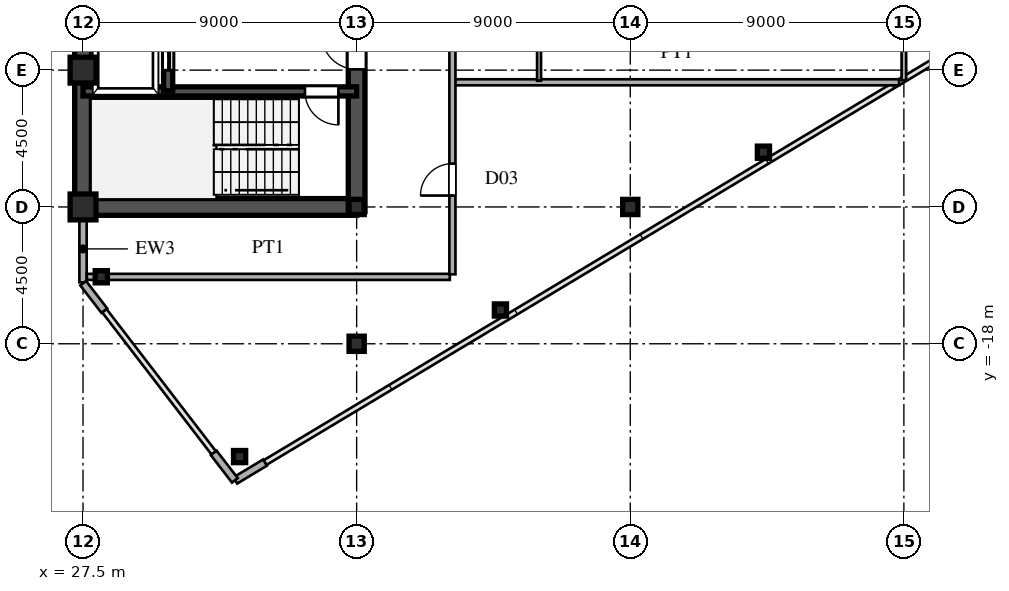
"""IFC4 building model, lengths in metres.
Left out: names, types, materials, properties, quantities, classifications, styles, units other than length and angle.
Written with IfcOpenShell. Run it as: python <this file> out.ifc"""

import sys

from ifc_helpers import new_model, si_unit, direction, frame, frame_2d, origin, origin_2d, place, context, subcontext, project, spatial, rectangle, hollow_rectangle, i_section, extrude, source, transform, mapped, element, fill, save


model = new_model("IFC4")
c1 = context("Model", 3, precision=1e-05, world=origin(), true_north=direction((0.0, 1.0)))
c2 = subcontext(c1, "Body", "Model", "MODEL_VIEW")
j1 = project(units=[si_unit("LENGTHUNIT", "METRE"), si_unit("PLANEANGLEUNIT", "RADIAN")], contexts=[c1])
p1 = place(None, origin())
s1 = spatial("IfcSite", under=j1, at=p1, CompositionType="ELEMENT")
p2 = place(p1, origin())
s2 = spatial("IfcBuilding", under=s1, at=p2, CompositionType="ELEMENT")
p3 = place(p2, frame((0.0, 0.0, 206.7)))
s3 = spatial("IfcBuildingStorey", under=s2, at=p3, CompositionType="ELEMENT", Elevation=206.7)
m1 = source(origin(), c2, "Body", "SweptSolid", [
    extrude(hollow_rectangle(XDim=0.85, YDim=0.85, WallThickness=0.036, at=origin_2d()), origin(), (0.0, 0.0, 1.0), 3.6),
])
for number, where, z_axis, x_axis in (
    (1, (27.5, -13.5, 0.0), (0.0, 0.0, 1.0), (1.0, 0.0, 0.0)),
    (2, (27.5, -9.0, 0.0), (0.0, 0.0, 1.0), (1.0, 0.0, 0.0)),
):
    element("IfcColumn", number, at=place(p3, frame(where, z_axis=z_axis, x_axis=x_axis)), inside=s3, PredefinedType="COLUMN", context=c2, shape_type="MappedRepresentation", body=[
        mapped(m1, transform((0.0, 0.0, 0.0), scale=1.0)),
    ])
m2 = source(origin(), c2, "Body", "SweptSolid", [
    extrude(i_section(OverallWidth=0.5, OverallDepth=0.5, WebThickness=0.02, FlangeThickness=0.032, at=origin_2d()), origin(), (0.0, 0.0, 1.0), 3.6),
])
for number, where, z_axis, x_axis in (
    (3, (36.5, -18.0, 0.0), (0.0, 0.0, 1.0), (1.0, 0.0, 0.0)),
    (4, (36.5, -13.5, 0.0), (0.0, 0.0, 1.0), (1.0, 0.0, 0.0)),
    (5, (45.5, -13.5, 0.0), (0.0, 0.0, 1.0), (1.0, 0.0, 0.0)),
):
    element("IfcColumn", number, at=place(p3, frame(where, z_axis=z_axis, x_axis=x_axis)), inside=s3, PredefinedType="COLUMN", context=c2, shape_type="MappedRepresentation", body=[
        mapped(m2, transform((0.0, 0.0, 0.0), scale=1.0)),
    ])
m3 = source(origin(), c2, "Body", "SweptSolid", [
    extrude(hollow_rectangle(XDim=0.4, YDim=0.4, WallThickness=0.016, at=origin_2d()), origin(), (0.0, 0.0, 1.0), 3.6),
])
for number, where, z_axis, x_axis in (
    (6, (32.65, -21.71, 0.0), (0.0, 0.0, 1.0), (1.0, 0.0, 0.0)),
    (7, (28.1, -15.796, 0.0), (0.0, 0.0, 1.0), (1.0, 0.0, 0.0)),
    (8, (41.23, -16.889, 0.0), (0.0, 0.0, 1.0), (1.0, 0.0, 0.0)),
    (9, (49.88, -11.699, 0.0), (0.0, 0.0, 1.0), (1.0, 0.0, 0.0)),
):
    element("IfcColumn", number, at=place(p3, frame(where, z_axis=z_axis, x_axis=x_axis)), inside=s3, PredefinedType="COLUMN", context=c2, shape_type="MappedRepresentation", body=[
        mapped(m3, transform((0.0, 0.0, 0.0), scale=1.0)),
    ])
p4 = place(p3, frame((32.509, -22.495, 0.0), z_axis=(0.0, 0.0, 1.0), x_axis=(0.85743623509, 0.514590228002, 0.0)))
e10 = element("IfcWall", 10, at=p4, inside=s3, PredefinedType="SOLIDWALL", context=c2, shape_type="SweptSolid", body=[
    extrude(rectangle(XDim=1.14, YDim=0.24, at=frame_2d((0.57, 0.0))), origin(), (0.0, 0.0, 1.0), 3.38),
])
p5 = place(p3, frame((27.5, -15.98, 0.0), z_axis=(0.0, 0.0, 1.0), x_axis=(0.0, 1.0, 0.0)))
e11 = element("IfcWall", 11, at=p5, inside=s3, PredefinedType="SOLIDWALL", context=c2, shape_type="SweptSolid", body=[
    extrude(rectangle(XDim=1.6, YDim=0.24, at=frame_2d((0.8, 0.0))), origin(), (0.0, 0.0, 1.0), 3.38),
])
p6 = place(p3, frame((27.5, -14.38, 0.0), z_axis=(0.0, 0.0, 1.0), x_axis=(0.0, 1.0, 0.0)))
e12 = element("IfcWall", 12, at=p6, inside=s3, PredefinedType="SOLIDWALL", context=c2, shape_type="SweptSolid", body=[
    extrude(rectangle(XDim=0.6, YDim=0.24, at=frame_2d((0.3, 0.0))), origin(), (0.0, 0.0, 1.0), 2.88),
])
for number, where, z_axis, x_axis in (
    (13, (27.506, -16.008, 0.0), (0.0, 0.0, 1.0), (0.61, -0.793, 0.0)),
    (14, (31.799, -21.588, 0.0), (0.0, 0.0, 1.0), (0.61, -0.793, 0.0)),
):
    element("IfcWall", number, at=place(p3, frame(where, z_axis=z_axis, x_axis=x_axis)), inside=s3, PredefinedType="SOLIDWALL", context=c2, shape_type="SweptSolid", body=[
        extrude(rectangle(XDim=1.14, YDim=0.24, at=frame_2d((0.57, 0.0))), origin(), (0.0, 0.0, 1.0), 3.38),
    ])
p7 = place(p3, frame((27.5, -13.5, 0.0), z_axis=(0.0, 0.0, 1.0), x_axis=(0.0, 1.0, 0.0)))
e15 = element("IfcWall", 15, at=p7, inside=s3, PredefinedType="SHEAR", context=c2, shape_type="SweptSolid", body=[
    extrude(rectangle(XDim=12.2, YDim=0.55, at=frame_2d((6.1, 0.0))), origin(), (0.0, 0.0, 1.0), 3.38),
])
p8 = place(p3, frame((27.5, -13.5, 0.0), z_axis=(0.0, 0.0, 1.0), x_axis=(1.0, 0.0, 0.0)))
e16 = element("IfcWall", 16, at=p8, inside=s3, PredefinedType="SHEAR", context=c2, shape_type="SweptSolid", body=[
    extrude(rectangle(XDim=9.0, YDim=0.55, at=frame_2d((4.5, 0.0))), origin(), (0.0, 0.0, 1.0), 3.38),
])
p9 = place(p3, frame((36.5, -13.65, 0.0), z_axis=(0.0, 0.0, 1.0), x_axis=(0.0, 1.0, 0.0)))
e17 = element("IfcWall", 17, at=p9, inside=s3, PredefinedType="SHEAR", context=c2, shape_type="SweptSolid", body=[
    extrude(rectangle(XDim=7.15, YDim=0.55, at=frame_2d((3.575, 0.0))), origin(), (0.0, 0.0, 1.0), 3.38),
])
p10 = place(p9, frame((4.675, 0.0, 0.0)))
e18 = element("IfcOpeningElement", 18, at=p10, cuts=e17, PredefinedType="OPENING", context=c2, shape_type="SweptSolid", body=[
    extrude(rectangle(XDim=1.15, YDim=2.2, at=frame_2d((0.575, 1.1))), frame((0.0, 0.285, 0.0), z_axis=(0.0, -1.0, 0.0), x_axis=(1.0, 0.0, 0.0)), (0.0, 0.0, 1.0), 0.57),
])
p11 = place(p3, frame((27.5, -9.7, 0.0), z_axis=(0.0, 0.0, 1.0), x_axis=(1.0, 0.0, 0.0)))
e19 = element("IfcWall", 19, at=p11, inside=s3, PredefinedType="SHEAR", context=c2, shape_type="SweptSolid", body=[
    extrude(rectangle(XDim=9.0, YDim=0.3, at=frame_2d((4.5, 0.0))), origin(), (0.0, 0.0, 1.0), 3.38),
])
p12 = place(p11, frame((7.3, 0.0, 0.0)))
e20 = element("IfcOpeningElement", 20, at=p12, cuts=e19, PredefinedType="OPENING", context=c2, shape_type="SweptSolid", body=[
    extrude(rectangle(XDim=1.1, YDim=2.2, at=frame_2d((0.55, 1.1))), frame((0.0, 0.16, 0.0), z_axis=(0.0, -1.0, 0.0), x_axis=(1.0, 0.0, 0.0)), (0.0, 0.0, 1.0), 0.32),
])
p13 = place(p3, frame((30.3, -9.68, 0.0), z_axis=(0.0, 0.0, 1.0), x_axis=(0.0, 1.0, 0.0)))
e21 = element("IfcWall", 21, at=p13, inside=s3, PredefinedType="SHEAR", context=c2, shape_type="SweptSolid", body=[
    extrude(rectangle(XDim=2.56, YDim=0.3, at=frame_2d((1.28, 0.0))), origin(), (0.0, 0.0, 1.0), 3.38),
])
p14 = place(p13, frame((0.68, 0.0, 0.0)))
e22 = element("IfcOpeningElement", 22, at=p14, cuts=e21, PredefinedType="OPENING", context=c2, shape_type="SweptSolid", body=[
    extrude(rectangle(XDim=1.2, YDim=2.25, at=frame_2d((0.6, 1.125))), frame((0.0, 0.16, 0.0), z_axis=(0.0, -1.0, 0.0), x_axis=(1.0, 0.0, 0.0)), (0.0, 0.0, 1.0), 0.32),
])
p15 = place(p3, frame((27.625, -15.8, 0.0), z_axis=(0.0, 0.0, 1.0), x_axis=(1.0, 0.0, 0.0)))
e23 = element("IfcWall", 23, at=p15, inside=s3, PredefinedType="PARTITIONING", context=c2, shape_type="SweptSolid", body=[
    extrude(rectangle(XDim=11.94, YDim=0.2, at=frame_2d((5.97, 0.0))), origin(), (0.0, 0.0, 1.0), 3.38),
])
p16 = place(p3, frame((39.73, -9.4, 0.0), z_axis=(0.0, 0.0, 1.0), x_axis=(1.0, 0.0, 0.0)))
e24 = element("IfcWall", 24, at=p16, inside=s3, PredefinedType="PARTITIONING", context=c2, shape_type="SweptSolid", body=[
    extrude(rectangle(XDim=14.613, YDim=0.2, at=frame_2d((7.307, 0.0))), origin(), (0.0, 0.0, 1.0), 3.38),
])
p17 = place(p3, frame((39.65, -15.715, 0.0), z_axis=(0.0, 0.0, 1.0), x_axis=(0.0, 1.0, 0.0)))
e25 = element("IfcWall", 25, at=p17, inside=s3, PredefinedType="PARTITIONING", context=c2, shape_type="SweptSolid", body=[
    extrude(rectangle(XDim=31.43, YDim=0.2, at=frame_2d((15.715, 0.0))), origin(), (0.0, 0.0, 1.0), 3.38),
])
p18 = place(p17, frame((2.59, 0.0, 0.0)))
e26 = element("IfcOpeningElement", 26, at=p18, cuts=e25, PredefinedType="OPENING", context=c2, shape_type="SweptSolid", body=[
    extrude(rectangle(XDim=1.05, YDim=2.25, at=frame_2d((0.525, 1.125))), frame((0.0, 0.11, 0.0), z_axis=(0.0, -1.0, 0.0), x_axis=(1.0, 0.0, 0.0)), (0.0, 0.0, 1.0), 0.22),
])
p19 = place(p17, frame((12.095, 0.0, 0.0)))
e27 = element("IfcOpeningElement", 27, at=p19, cuts=e25, PredefinedType="OPENING", context=c2, shape_type="SweptSolid", body=[
    extrude(rectangle(XDim=1.05, YDim=2.25, at=frame_2d((0.525, 1.125))), frame((0.0, 0.11, 0.0), z_axis=(0.0, -1.0, 0.0), x_axis=(1.0, 0.0, 0.0)), (0.0, 0.0, 1.0), 0.22),
])
p20 = place(p17, frame((24.89, 0.0, 0.0)))
e28 = element("IfcOpeningElement", 28, at=p20, cuts=e25, PredefinedType="OPENING", context=c2, shape_type="SweptSolid", body=[
    extrude(rectangle(XDim=1.05, YDim=2.25, at=frame_2d((0.525, 1.125))), frame((0.0, 0.11, 0.0), z_axis=(0.0, -1.0, 0.0), x_axis=(1.0, 0.0, 0.0)), (0.0, 0.0, 1.0), 0.22),
])
p21 = place(p3, frame((42.5, -9.35, 0.0), z_axis=(0.0, 0.0, 1.0), x_axis=(0.0, 1.0, 0.0)))
e29 = element("IfcWall", 29, at=p21, inside=s3, PredefinedType="PARTITIONING", context=c2, shape_type="SweptSolid", body=[
    extrude(rectangle(XDim=3.408, YDim=0.13, at=frame_2d((1.704, 0.0))), origin(), (0.0, 0.0, 1.0), 3.38),
])
p22 = place(p3, frame((54.5, -9.335, 0.0), z_axis=(0.0, 0.0, 1.0), x_axis=(0.0, 1.0, 0.0)))
e30 = element("IfcWall", 30, at=p22, inside=s3, PredefinedType="PARTITIONING", context=c2, shape_type="SweptSolid", body=[
    extrude(rectangle(XDim=12.885, YDim=0.15, at=frame_2d((6.442, 0.0))), origin(), (0.0, 0.0, 1.0), 2.78),
])
p23 = place(p22, frame((5.96, 0.0, 0.0)))
e31 = element("IfcOpeningElement", 31, at=p23, cuts=e30, PredefinedType="OPENING", context=c2, shape_type="SweptSolid", body=[
    extrude(rectangle(XDim=0.95, YDim=2.15, at=frame_2d((0.475, 1.075))), frame((0.0, 0.085, 0.0), z_axis=(0.0, -1.0, 0.0), x_axis=(1.0, 0.0, 0.0)), (0.0, 0.0, 1.0), 0.17),
])
p24 = place(p22, frame((1.677, 0.0, 0.0)))
e32 = element("IfcOpeningElement", 32, at=p24, cuts=e30, PredefinedType="OPENING", context=c2, shape_type="SweptSolid", body=[
    extrude(rectangle(XDim=0.95, YDim=2.15, at=frame_2d((0.475, 1.075))), frame((0.0, 0.085, 0.0), z_axis=(0.0, -1.0, 0.0), x_axis=(1.0, 0.0, 0.0)), (0.0, 0.0, 1.0), 0.17),
])
p25 = place(p22, frame((10.293, 0.0, 0.0)))
e33 = element("IfcOpeningElement", 33, at=p25, cuts=e30, PredefinedType="OPENING", context=c2, shape_type="SweptSolid", body=[
    extrude(rectangle(XDim=0.95, YDim=2.15, at=frame_2d((0.475, 1.075))), frame((0.0, 0.085, 0.0), z_axis=(0.0, -1.0, 0.0), x_axis=(1.0, 0.0, 0.0)), (0.0, 0.0, 1.0), 0.17),
])
m4 = source(origin(), c2, "Body", "SweptSolid", [
    extrude(rectangle(XDim=1.15, YDim=2.2, at=frame_2d((0.575, 1.1))), frame((0.0, 0.025, 0.0), z_axis=(0.0, -1.0, 0.0), x_axis=(1.0, 0.0, 0.0)), (0.0, 0.0, 1.0), 0.05),
])
p26 = place(p10, origin())
e34 = element("IfcDoor", 34, at=p26, inside=s3, OperationType="SINGLE_SWING_RIGHT", PredefinedType="DOOR", context=c2, shape_type="MappedRepresentation", body=[
    mapped(m4, transform((0.0, 0.0, 0.0), scale=1.0)),
])
fill(e18, e34)
m5 = source(origin(), c2, "Body", "SweptSolid", [
    extrude(rectangle(XDim=1.1, YDim=2.2, at=frame_2d((0.55, 1.1))), frame((0.0, 0.025, 0.0), z_axis=(0.0, -1.0, 0.0), x_axis=(1.0, 0.0, 0.0)), (0.0, 0.0, 1.0), 0.05),
])
p27 = place(p12, frame((1.1, 0.0, 0.0), z_axis=(0.0, 0.0, 1.0), x_axis=(-1.0, 0.0, 0.0)))
e35 = element("IfcDoor", 35, at=p27, inside=s3, OperationType="SINGLE_SWING_RIGHT", PredefinedType="DOOR", context=c2, shape_type="MappedRepresentation", body=[
    mapped(m5, transform((0.0, 0.0, 0.0), scale=1.0)),
])
fill(e20, e35)
m6 = source(origin(), c2, "Body", "SweptSolid", [
    extrude(rectangle(XDim=1.2, YDim=2.25, at=frame_2d((0.6, 1.125))), frame((0.0, 0.025, 0.0), z_axis=(0.0, -1.0, 0.0), x_axis=(1.0, 0.0, 0.0)), (0.0, 0.0, 1.0), 0.05),
])
p28 = place(p14, origin())
e36 = element("IfcDoor", 36, at=p28, inside=s3, OperationType="DOUBLE_DOOR_SLIDING", PredefinedType="DOOR", context=c2, shape_type="MappedRepresentation", body=[
    mapped(m6, transform((0.0, 0.0, 0.0), scale=1.0)),
])
fill(e22, e36)
m7 = source(origin(), c2, "Body", "SweptSolid", [
    extrude(rectangle(XDim=1.05, YDim=2.25, at=frame_2d((0.525, 1.125))), frame((0.0, 0.025, 0.0), z_axis=(0.0, -1.0, 0.0), x_axis=(1.0, 0.0, 0.0)), (0.0, 0.0, 1.0), 0.05),
])
p29 = place(p18, origin())
e37 = element("IfcDoor", 37, at=p29, inside=s3, OperationType="SINGLE_SWING_LEFT", PredefinedType="DOOR", context=c2, shape_type="MappedRepresentation", body=[
    mapped(m7, transform((0.0, 0.0, 0.0), scale=1.0)),
])
fill(e26, e37)
save(model, sys.argv[1])
